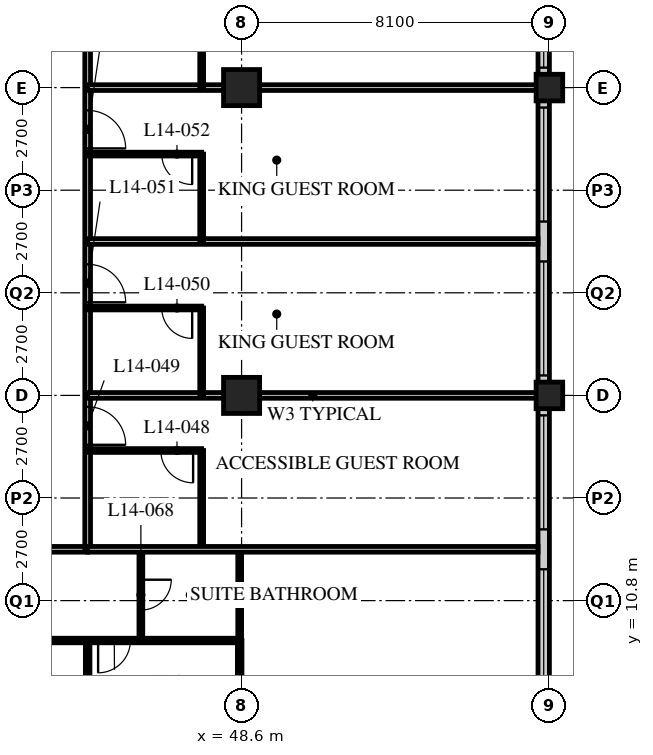
"""IFC4 building model, lengths in metres.
Left out: names, types, materials, properties, quantities, classifications, styles, units other than length and angle.
Written with IfcOpenShell. Run it as: python <this file> out.ifc"""

import sys

from ifc_helpers import new_model, si_unit, direction, frame, frame_2d, origin, origin_2d, place, context, subcontext, project, spatial, rectangle, hollow_rectangle, extrude, element, fill, save


model = new_model("IFC4")
c1 = context("Model", 3, precision=1e-05, world=origin(), true_north=direction((0.0, 1.0)))
c2 = subcontext(c1, "Body", "Model", "MODEL_VIEW")
j1 = project(units=[si_unit("LENGTHUNIT", "METRE"), si_unit("PLANEANGLEUNIT", "RADIAN")], contexts=[c1])
p1 = place(None, origin())
s1 = spatial("IfcSite", under=j1, at=p1, CompositionType="ELEMENT")
p2 = place(p1, origin())
s2 = spatial("IfcBuilding", under=s1, at=p2, CompositionType="ELEMENT")
p3 = place(p2, frame((0.0, 0.0, 60.2)))
s3 = spatial("IfcBuildingStorey", under=s2, at=p3, CompositionType="ELEMENT", Elevation=60.2)
for number, where, z_axis, x_axis in (
    (1, (48.6, 16.2, 0.0), (0.0, 0.0, 1.0), (1.0, 0.0, 0.0)),
    (2, (48.6, 24.3, 0.0), (0.0, 0.0, 1.0), (1.0, 0.0, 0.0)),
):
    element("IfcColumn", number, at=place(p3, frame(where, z_axis=z_axis, x_axis=x_axis)), inside=s3, PredefinedType="COLUMN", context=c2, shape_type="SweptSolid", body=[
        extrude(hollow_rectangle(XDim=0.95, YDim=0.95, WallThickness=0.095, at=origin_2d()), origin(), (0.0, 0.0, 1.0), 3.4),
    ])
for number, where, z_axis, x_axis in (
    (3, (56.7, 16.2, 0.0), (0.0, 0.0, 1.0), (1.0, 0.0, 0.0)),
    (4, (56.7, 24.3, 0.0), (0.0, 0.0, 1.0), (1.0, 0.0, 0.0)),
):
    element("IfcColumn", number, at=place(p3, frame(where, z_axis=z_axis, x_axis=x_axis)), inside=s3, PredefinedType="COLUMN", context=c2, shape_type="SweptSolid", body=[
        extrude(hollow_rectangle(XDim=0.7, YDim=0.7, WallThickness=0.06, at=origin_2d()), origin(), (0.0, 0.0, 1.0), 3.4),
    ])
p4 = place(p3, frame((56.55, 8.4, 0.0), z_axis=(0.0, 0.0, 1.0), x_axis=(0.0, 1.0, 0.0)))
e5 = element("IfcWall", 5, at=p4, inside=s3, PredefinedType="SOLIDWALL", context=c2, shape_type="SweptSolid", body=[
    extrude(rectangle(XDim=32.1, YDim=0.3, at=frame_2d((16.05, 0.0))), origin(), (0.0, 0.0, 1.0), 3.19),
])
p5 = place(p4, frame((0.225, 0.0, 0.9)))
e6 = element("IfcOpeningElement", 6, at=p5, cuts=e5, PredefinedType="OPENING", context=c2, shape_type="SweptSolid", body=[
    extrude(rectangle(XDim=3.0, YDim=2.0, at=frame_2d((1.5, 1.0))), frame((0.0, 0.16, 0.0), z_axis=(0.0, -1.0, 0.0), x_axis=(1.0, 0.0, 0.0)), (0.0, 0.0, 1.0), 0.32),
])
p6 = place(p4, frame((4.275, 0.0, 0.9)))
e7 = element("IfcOpeningElement", 7, at=p6, cuts=e5, PredefinedType="OPENING", context=c2, shape_type="SweptSolid", body=[
    extrude(rectangle(XDim=3.0, YDim=2.0, at=frame_2d((1.5, 1.0))), frame((0.0, 0.16, 0.0), z_axis=(0.0, -1.0, 0.0), x_axis=(1.0, 0.0, 0.0)), (0.0, 0.0, 1.0), 0.32),
])
p7 = place(p4, frame((8.325, 0.0, 0.9)))
e8 = element("IfcOpeningElement", 8, at=p7, cuts=e5, PredefinedType="OPENING", context=c2, shape_type="SweptSolid", body=[
    extrude(rectangle(XDim=3.0, YDim=2.0, at=frame_2d((1.5, 1.0))), frame((0.0, 0.16, 0.0), z_axis=(0.0, -1.0, 0.0), x_axis=(1.0, 0.0, 0.0)), (0.0, 0.0, 1.0), 0.32),
])
p8 = place(p4, frame((12.375, 0.0, 0.9)))
e9 = element("IfcOpeningElement", 9, at=p8, cuts=e5, PredefinedType="OPENING", context=c2, shape_type="SweptSolid", body=[
    extrude(rectangle(XDim=3.0, YDim=2.0, at=frame_2d((1.5, 1.0))), frame((0.0, 0.16, 0.0), z_axis=(0.0, -1.0, 0.0), x_axis=(1.0, 0.0, 0.0)), (0.0, 0.0, 1.0), 0.32),
])
p9 = place(p4, frame((16.425, 0.0, 0.9)))
e10 = element("IfcOpeningElement", 10, at=p9, cuts=e5, PredefinedType="OPENING", context=c2, shape_type="SweptSolid", body=[
    extrude(rectangle(XDim=3.0, YDim=2.0, at=frame_2d((1.5, 1.0))), frame((0.0, 0.16, 0.0), z_axis=(0.0, -1.0, 0.0), x_axis=(1.0, 0.0, 0.0)), (0.0, 0.0, 1.0), 0.32),
])
p10 = place(p4, frame((20.475, 0.0, 0.9)))
e11 = element("IfcOpeningElement", 11, at=p10, cuts=e5, PredefinedType="OPENING", context=c2, shape_type="SweptSolid", body=[
    extrude(rectangle(XDim=3.0, YDim=2.0, at=frame_2d((1.5, 1.0))), frame((0.0, 0.16, 0.0), z_axis=(0.0, -1.0, 0.0), x_axis=(1.0, 0.0, 0.0)), (0.0, 0.0, 1.0), 0.32),
])
p11 = place(p4, frame((24.525, 0.0, 0.9)))
e12 = element("IfcOpeningElement", 12, at=p11, cuts=e5, PredefinedType="OPENING", context=c2, shape_type="SweptSolid", body=[
    extrude(rectangle(XDim=3.0, YDim=2.0, at=frame_2d((1.5, 1.0))), frame((0.0, 0.16, 0.0), z_axis=(0.0, -1.0, 0.0), x_axis=(1.0, 0.0, 0.0)), (0.0, 0.0, 1.0), 0.32),
])
p12 = place(p4, frame((28.575, 0.0, 0.9)))
e13 = element("IfcOpeningElement", 13, at=p12, cuts=e5, PredefinedType="OPENING", context=c2, shape_type="SweptSolid", body=[
    extrude(rectangle(XDim=3.0, YDim=2.0, at=frame_2d((1.5, 1.0))), frame((0.0, 0.16, 0.0), z_axis=(0.0, -1.0, 0.0), x_axis=(1.0, 0.0, 0.0)), (0.0, 0.0, 1.0), 0.32),
])
p13 = place(p3, frame((12.15, 12.15, 0.0), z_axis=(0.0, 0.0, 1.0), x_axis=(1.0, 0.0, 0.0)))
e14 = element("IfcWall", 14, at=p13, inside=s3, PredefinedType="PARTITIONING", context=c2, shape_type="SweptSolid", body=[
    extrude(rectangle(XDim=32.4, YDim=0.15, at=frame_2d((16.2, 0.0))), origin(), (0.0, 0.0, 1.0), 3.19),
])
p14 = place(p13, frame((6.5, 0.0, 0.0)))
e15 = element("IfcOpeningElement", 15, at=p14, cuts=e14, PredefinedType="OPENING", context=c2, shape_type="SweptSolid", body=[
    extrude(rectangle(XDim=1.0, YDim=2.1, at=frame_2d((0.5, 1.05))), frame((0.0, 0.085, 0.0), z_axis=(0.0, -1.0, 0.0), x_axis=(1.0, 0.0, 0.0)), (0.0, 0.0, 1.0), 0.17),
])
p15 = place(p13, frame((8.4, 0.0, 0.0)))
e16 = element("IfcOpeningElement", 16, at=p15, cuts=e14, PredefinedType="OPENING", context=c2, shape_type="SweptSolid", body=[
    extrude(rectangle(XDim=1.0, YDim=2.1, at=frame_2d((0.5, 1.05))), frame((0.0, 0.085, 0.0), z_axis=(0.0, -1.0, 0.0), x_axis=(1.0, 0.0, 0.0)), (0.0, 0.0, 1.0), 0.17),
])
p16 = place(p13, frame((14.6, 0.0, 0.0)))
e17 = element("IfcOpeningElement", 17, at=p16, cuts=e14, PredefinedType="OPENING", context=c2, shape_type="SweptSolid", body=[
    extrude(rectangle(XDim=1.0, YDim=2.1, at=frame_2d((0.5, 1.05))), frame((0.0, 0.085, 0.0), z_axis=(0.0, -1.0, 0.0), x_axis=(1.0, 0.0, 0.0)), (0.0, 0.0, 1.0), 0.17),
])
p17 = place(p13, frame((18.65, 0.0, 0.0)))
e18 = element("IfcOpeningElement", 18, at=p17, cuts=e14, PredefinedType="OPENING", context=c2, shape_type="SweptSolid", body=[
    extrude(rectangle(XDim=1.0, YDim=2.1, at=frame_2d((0.5, 1.05))), frame((0.0, 0.085, 0.0), z_axis=(0.0, -1.0, 0.0), x_axis=(1.0, 0.0, 0.0)), (0.0, 0.0, 1.0), 0.17),
])
p18 = place(p13, frame((20.55, 0.0, 0.0)))
e19 = element("IfcOpeningElement", 19, at=p18, cuts=e14, PredefinedType="OPENING", context=c2, shape_type="SweptSolid", body=[
    extrude(rectangle(XDim=1.0, YDim=2.1, at=frame_2d((0.5, 1.05))), frame((0.0, 0.085, 0.0), z_axis=(0.0, -1.0, 0.0), x_axis=(1.0, 0.0, 0.0)), (0.0, 0.0, 1.0), 0.17),
])
p19 = place(p13, frame((26.75, 0.0, 0.0)))
e20 = element("IfcOpeningElement", 20, at=p19, cuts=e14, PredefinedType="OPENING", context=c2, shape_type="SweptSolid", body=[
    extrude(rectangle(XDim=1.0, YDim=2.1, at=frame_2d((0.5, 1.05))), frame((0.0, 0.085, 0.0), z_axis=(0.0, -1.0, 0.0), x_axis=(1.0, 0.0, 0.0)), (0.0, 0.0, 1.0), 0.17),
])
p20 = place(p13, frame((1.525, 0.0, 0.0)))
e21 = element("IfcOpeningElement", 21, at=p20, cuts=e14, PredefinedType="OPENING", context=c2, shape_type="SweptSolid", body=[
    extrude(rectangle(XDim=1.0, YDim=2.1, at=frame_2d((0.5, 1.05))), frame((0.0, 0.085, 0.0), z_axis=(0.0, -1.0, 0.0), x_axis=(1.0, 0.0, 0.0)), (0.0, 0.0, 1.0), 0.17),
])
p21 = place(p13, frame((29.875, 0.0, 0.0)))
e22 = element("IfcOpeningElement", 22, at=p21, cuts=e14, PredefinedType="OPENING", context=c2, shape_type="SweptSolid", body=[
    extrude(rectangle(XDim=1.0, YDim=2.1, at=frame_2d((0.5, 1.05))), frame((0.0, 0.085, 0.0), z_axis=(0.0, -1.0, 0.0), x_axis=(1.0, 0.0, 0.0)), (0.0, 0.0, 1.0), 0.17),
])
p22 = place(p3, frame((44.55, 12.15, 0.0), z_axis=(0.0, 0.0, 1.0), x_axis=(0.0, 1.0, 0.0)))
e23 = element("IfcWall", 23, at=p22, inside=s3, PredefinedType="PARTITIONING", context=c2, shape_type="SweptSolid", body=[
    extrude(rectangle(XDim=30.15, YDim=0.15, at=frame_2d((15.075, 0.0))), origin(), (0.0, 0.0, 1.0), 3.19),
])
p23 = place(p22, frame((2.75, 0.0, 0.0)))
e24 = element("IfcOpeningElement", 24, at=p23, cuts=e23, PredefinedType="OPENING", context=c2, shape_type="SweptSolid", body=[
    extrude(rectangle(XDim=1.0, YDim=2.1, at=frame_2d((0.5, 1.05))), frame((0.0, 0.085, 0.0), z_axis=(0.0, -1.0, 0.0), x_axis=(1.0, 0.0, 0.0)), (0.0, 0.0, 1.0), 0.17),
])
p24 = place(p22, frame((6.5, 0.0, 0.0)))
e25 = element("IfcOpeningElement", 25, at=p24, cuts=e23, PredefinedType="OPENING", context=c2, shape_type="SweptSolid", body=[
    extrude(rectangle(XDim=1.0, YDim=2.1, at=frame_2d((0.5, 1.05))), frame((0.0, 0.085, 0.0), z_axis=(0.0, -1.0, 0.0), x_axis=(1.0, 0.0, 0.0)), (0.0, 0.0, 1.0), 0.17),
])
p25 = place(p22, frame((10.55, 0.0, 0.0)))
e26 = element("IfcOpeningElement", 26, at=p25, cuts=e23, PredefinedType="OPENING", context=c2, shape_type="SweptSolid", body=[
    extrude(rectangle(XDim=1.0, YDim=2.1, at=frame_2d((0.5, 1.05))), frame((0.0, 0.085, 0.0), z_axis=(0.0, -1.0, 0.0), x_axis=(1.0, 0.0, 0.0)), (0.0, 0.0, 1.0), 0.17),
])
p26 = place(p22, frame((14.6, 0.0, 0.0)))
e27 = element("IfcOpeningElement", 27, at=p26, cuts=e23, PredefinedType="OPENING", context=c2, shape_type="SweptSolid", body=[
    extrude(rectangle(XDim=1.0, YDim=2.1, at=frame_2d((0.5, 1.05))), frame((0.0, 0.085, 0.0), z_axis=(0.0, -1.0, 0.0), x_axis=(1.0, 0.0, 0.0)), (0.0, 0.0, 1.0), 0.17),
])
p27 = place(p22, frame((18.65, 0.0, 0.0)))
e28 = element("IfcOpeningElement", 28, at=p27, cuts=e23, PredefinedType="OPENING", context=c2, shape_type="SweptSolid", body=[
    extrude(rectangle(XDim=1.0, YDim=2.1, at=frame_2d((0.5, 1.05))), frame((0.0, 0.085, 0.0), z_axis=(0.0, -1.0, 0.0), x_axis=(1.0, 0.0, 0.0)), (0.0, 0.0, 1.0), 0.17),
])
p28 = place(p22, frame((22.7, 0.0, 0.0)))
e29 = element("IfcOpeningElement", 29, at=p28, cuts=e23, PredefinedType="OPENING", context=c2, shape_type="SweptSolid", body=[
    extrude(rectangle(XDim=1.0, YDim=2.1, at=frame_2d((0.5, 1.05))), frame((0.0, 0.085, 0.0), z_axis=(0.0, -1.0, 0.0), x_axis=(1.0, 0.0, 0.0)), (0.0, 0.0, 1.0), 0.17),
])
p29 = place(p22, frame((26.7, 0.0, 0.0)))
e30 = element("IfcOpeningElement", 30, at=p29, cuts=e23, PredefinedType="OPENING", context=c2, shape_type="SweptSolid", body=[
    extrude(rectangle(XDim=1.0, YDim=2.1, at=frame_2d((0.5, 1.05))), frame((0.0, 0.085, 0.0), z_axis=(0.0, -1.0, 0.0), x_axis=(1.0, 0.0, 0.0)), (0.0, 0.0, 1.0), 0.17),
])
p30 = place(p3, frame((47.55, 12.15, 0.0), z_axis=(0.0, 0.0, 1.0), x_axis=(0.0, 1.0, 0.0)))
e31 = element("IfcWall", 31, at=p30, inside=s3, PredefinedType="PARTITIONING", context=c2, shape_type="SweptSolid", body=[
    extrude(rectangle(XDim=2.6, YDim=0.1, at=frame_2d((1.3, 0.0))), origin(), (0.0, 0.0, 1.0), 3.19),
])
p31 = place(p3, frame((44.55, 14.75, 0.0), z_axis=(0.0, 0.0, 1.0), x_axis=(1.0, 0.0, 0.0)))
e32 = element("IfcWall", 32, at=p31, inside=s3, PredefinedType="PARTITIONING", context=c2, shape_type="SweptSolid", body=[
    extrude(rectangle(XDim=3.0, YDim=0.1, at=frame_2d((1.5, 0.0))), origin(), (0.0, 0.0, 1.0), 3.19),
])
p32 = place(p31, frame((1.925, 0.0, 0.0)))
e33 = element("IfcOpeningElement", 33, at=p32, cuts=e32, PredefinedType="OPENING", context=c2, shape_type="SweptSolid", body=[
    extrude(rectangle(XDim=0.85, YDim=2.1, at=frame_2d((0.425, 1.05))), frame((0.0, 0.06, 0.0), z_axis=(0.0, -1.0, 0.0), x_axis=(1.0, 0.0, 0.0)), (0.0, 0.0, 1.0), 0.12),
])
p33 = place(p3, frame((44.55, 16.2, 0.0), z_axis=(0.0, 0.0, 1.0), x_axis=(1.0, 0.0, 0.0)))
e34 = element("IfcWall", 34, at=p33, inside=s3, PredefinedType="PARTITIONING", context=c2, shape_type="SweptSolid", body=[
    extrude(rectangle(XDim=11.85, YDim=0.15, at=frame_2d((5.925, 0.0))), origin(), (0.0, 0.0, 1.0), 2.578),
])
p34 = place(p3, frame((47.55, 16.2, 0.0), z_axis=(0.0, 0.0, 1.0), x_axis=(0.0, 1.0, 0.0)))
e35 = element("IfcWall", 35, at=p34, inside=s3, PredefinedType="PARTITIONING", context=c2, shape_type="SweptSolid", body=[
    extrude(rectangle(XDim=2.3, YDim=0.1, at=frame_2d((1.15, 0.0))), origin(), (0.0, 0.0, 1.0), 3.19),
])
p35 = place(p3, frame((44.55, 18.5, 0.0), z_axis=(0.0, 0.0, 1.0), x_axis=(1.0, 0.0, 0.0)))
e36 = element("IfcWall", 36, at=p35, inside=s3, PredefinedType="PARTITIONING", context=c2, shape_type="SweptSolid", body=[
    extrude(rectangle(XDim=3.0, YDim=0.1, at=frame_2d((1.5, 0.0))), origin(), (0.0, 0.0, 1.0), 3.19),
])
p36 = place(p35, frame((1.95, 0.0, 0.0)))
e37 = element("IfcOpeningElement", 37, at=p36, cuts=e36, PredefinedType="OPENING", context=c2, shape_type="SweptSolid", body=[
    extrude(rectangle(XDim=0.8, YDim=2.1, at=frame_2d((0.4, 1.05))), frame((0.0, 0.06, 0.0), z_axis=(0.0, -1.0, 0.0), x_axis=(1.0, 0.0, 0.0)), (0.0, 0.0, 1.0), 0.12),
])
p37 = place(p3, frame((44.55, 20.25, 0.0), z_axis=(0.0, 0.0, 1.0), x_axis=(1.0, 0.0, 0.0)))
e38 = element("IfcWall", 38, at=p37, inside=s3, PredefinedType="PARTITIONING", context=c2, shape_type="SweptSolid", body=[
    extrude(rectangle(XDim=11.85, YDim=0.15, at=frame_2d((5.925, 0.0))), origin(), (0.0, 0.0, 1.0), 3.19),
])
p38 = place(p3, frame((47.55, 20.25, 0.0), z_axis=(0.0, 0.0, 1.0), x_axis=(0.0, 1.0, 0.0)))
e39 = element("IfcWall", 39, at=p38, inside=s3, PredefinedType="PARTITIONING", context=c2, shape_type="SweptSolid", body=[
    extrude(rectangle(XDim=2.3, YDim=0.1, at=frame_2d((1.15, 0.0))), origin(), (0.0, 0.0, 1.0), 3.19),
])
p39 = place(p3, frame((44.55, 22.55, 0.0), z_axis=(0.0, 0.0, 1.0), x_axis=(1.0, 0.0, 0.0)))
e40 = element("IfcWall", 40, at=p39, inside=s3, PredefinedType="PARTITIONING", context=c2, shape_type="SweptSolid", body=[
    extrude(rectangle(XDim=3.0, YDim=0.1, at=frame_2d((1.5, 0.0))), origin(), (0.0, 0.0, 1.0), 3.19),
])
p40 = place(p39, frame((1.95, 0.0, 0.0)))
e41 = element("IfcOpeningElement", 41, at=p40, cuts=e40, PredefinedType="OPENING", context=c2, shape_type="SweptSolid", body=[
    extrude(rectangle(XDim=0.8, YDim=2.1, at=frame_2d((0.4, 1.05))), frame((0.0, 0.06, 0.0), z_axis=(0.0, -1.0, 0.0), x_axis=(1.0, 0.0, 0.0)), (0.0, 0.0, 1.0), 0.12),
])
p41 = place(p3, frame((44.55, 24.3, 0.0), z_axis=(0.0, 0.0, 1.0), x_axis=(1.0, 0.0, 0.0)))
e42 = element("IfcWall", 42, at=p41, inside=s3, PredefinedType="PARTITIONING", context=c2, shape_type="SweptSolid", body=[
    extrude(rectangle(XDim=11.85, YDim=0.15, at=frame_2d((5.925, 0.0))), origin(), (0.0, 0.0, 1.0), 2.578),
])
p42 = place(p3, frame((47.55, 24.3, 0.0), z_axis=(0.0, 0.0, 1.0), x_axis=(0.0, 1.0, 0.0)))
e43 = element("IfcWall", 43, at=p42, inside=s3, PredefinedType="PARTITIONING", context=c2, shape_type="SweptSolid", body=[
    extrude(rectangle(XDim=2.3, YDim=0.1, at=frame_2d((1.15, 0.0))), origin(), (0.0, 0.0, 1.0), 3.19),
])
p43 = place(p3, frame((40.5, 9.75, 0.0), z_axis=(0.0, 0.0, 1.0), x_axis=(1.0, 0.0, 0.0)))
e44 = element("IfcWall", 44, at=p43, inside=s3, PredefinedType="PARTITIONING", context=c2, shape_type="SweptSolid", body=[
    extrude(rectangle(XDim=8.05, YDim=0.12, at=frame_2d((4.025, 0.0))), origin(), (0.0, 0.0, 1.0), 3.19),
])
p44 = place(p43, frame((0.475, 0.0, 0.0)))
e45 = element("IfcOpeningElement", 45, at=p44, cuts=e44, PredefinedType="OPENING", context=c2, shape_type="SweptSolid", body=[
    extrude(rectangle(XDim=0.85, YDim=2.1, at=frame_2d((0.425, 1.05))), frame((0.0, 0.07, 0.0), z_axis=(0.0, -1.0, 0.0), x_axis=(1.0, 0.0, 0.0)), (0.0, 0.0, 1.0), 0.14),
])
p45 = place(p43, frame((4.325, 0.0, 0.0)))
e46 = element("IfcOpeningElement", 46, at=p45, cuts=e44, PredefinedType="OPENING", context=c2, shape_type="SweptSolid", body=[
    extrude(rectangle(XDim=0.85, YDim=2.1, at=frame_2d((0.425, 1.05))), frame((0.0, 0.07, 0.0), z_axis=(0.0, -1.0, 0.0), x_axis=(1.0, 0.0, 0.0)), (0.0, 0.0, 1.0), 0.14),
])
p46 = place(p3, frame((45.95, 12.15, 0.0), z_axis=(0.0, 0.0, 1.0), x_axis=(0.0, -1.0, 0.0)))
e47 = element("IfcWall", 47, at=p46, inside=s3, PredefinedType="PARTITIONING", context=c2, shape_type="SweptSolid", body=[
    extrude(rectangle(XDim=2.4, YDim=0.1, at=frame_2d((1.2, 0.0))), origin(), (0.0, 0.0, 1.0), 3.19),
])
p47 = place(p46, frame((0.8, 0.0, 0.0)))
e48 = element("IfcOpeningElement", 48, at=p47, cuts=e47, PredefinedType="OPENING", context=c2, shape_type="SweptSolid", body=[
    extrude(rectangle(XDim=0.8, YDim=2.1, at=frame_2d((0.4, 1.05))), frame((0.0, 0.06, 0.0), z_axis=(0.0, -1.0, 0.0), x_axis=(1.0, 0.0, 0.0)), (0.0, 0.0, 1.0), 0.12),
])
p48 = place(p3, frame((48.55, 12.15, 0.0), z_axis=(0.0, 0.0, 1.0), x_axis=(0.0, -1.0, 0.0)))
e49 = element("IfcWall", 49, at=p48, inside=s3, PredefinedType="PARTITIONING", context=c2, shape_type="SweptSolid", body=[
    extrude(rectangle(XDim=2.4, YDim=0.1, at=frame_2d((1.2, 0.0))), origin(), (0.0, 0.0, 1.0), 2.578),
])
p49 = place(p3, frame((44.55, 9.75, 0.0), z_axis=(0.0, 0.0, 1.0), x_axis=(0.0, -1.0, 0.0)))
e50 = element("IfcWall", 50, at=p49, inside=s3, PredefinedType="PARTITIONING", context=c2, shape_type="SweptSolid", body=[
    extrude(rectangle(XDim=9.45, YDim=0.12, at=frame_2d((4.725, 0.0))), origin(), (0.0, 0.0, 1.0), 3.19),
])
p50 = place(p3, frame((44.55, 12.15, 0.0), z_axis=(0.0, 0.0, 1.0), x_axis=(1.0, 0.0, 0.0)))
e51 = element("IfcWall", 51, at=p50, inside=s3, PredefinedType="PARTITIONING", context=c2, shape_type="SweptSolid", body=[
    extrude(rectangle(XDim=11.85, YDim=0.15, at=frame_2d((5.925, 0.0))), origin(), (0.0, 0.0, 1.0), 3.19),
])
p51 = place(p3, frame((48.55, 9.75, 0.0), z_axis=(0.0, 0.0, 1.0), x_axis=(0.0, -1.0, 0.0)))
e52 = element("IfcWall", 52, at=p51, inside=s3, PredefinedType="PARTITIONING", context=c2, shape_type="SweptSolid", body=[
    extrude(rectangle(XDim=1.175, YDim=0.12, at=frame_2d((0.587, 0.0))), origin(), (0.0, 0.0, 1.0), 2.578),
])
p52 = place(p5, origin())
e53 = element("IfcWindow", 53, at=p52, inside=s3, PartitioningType="SINGLE_PANEL", PredefinedType="WINDOW", context=c2, shape_type="SweptSolid", body=[
    extrude(rectangle(XDim=3.0, YDim=2.0, at=frame_2d((1.5, 1.0))), frame((0.0, 0.03, 0.0), z_axis=(0.0, -1.0, 0.0), x_axis=(1.0, 0.0, 0.0)), (0.0, 0.0, 1.0), 0.06),
])
fill(e6, e53)
p53 = place(p6, origin())
e54 = element("IfcWindow", 54, at=p53, inside=s3, PartitioningType="SINGLE_PANEL", PredefinedType="WINDOW", context=c2, shape_type="SweptSolid", body=[
    extrude(rectangle(XDim=3.0, YDim=2.0, at=frame_2d((1.5, 1.0))), frame((0.0, 0.03, 0.0), z_axis=(0.0, -1.0, 0.0), x_axis=(1.0, 0.0, 0.0)), (0.0, 0.0, 1.0), 0.06),
])
fill(e7, e54)
p54 = place(p7, origin())
e55 = element("IfcWindow", 55, at=p54, inside=s3, PartitioningType="SINGLE_PANEL", PredefinedType="WINDOW", context=c2, shape_type="SweptSolid", body=[
    extrude(rectangle(XDim=3.0, YDim=2.0, at=frame_2d((1.5, 1.0))), frame((0.0, 0.03, 0.0), z_axis=(0.0, -1.0, 0.0), x_axis=(1.0, 0.0, 0.0)), (0.0, 0.0, 1.0), 0.06),
])
fill(e8, e55)
p55 = place(p8, origin())
e56 = element("IfcWindow", 56, at=p55, inside=s3, PartitioningType="SINGLE_PANEL", PredefinedType="WINDOW", context=c2, shape_type="SweptSolid", body=[
    extrude(rectangle(XDim=3.0, YDim=2.0, at=frame_2d((1.5, 1.0))), frame((0.0, 0.03, 0.0), z_axis=(0.0, -1.0, 0.0), x_axis=(1.0, 0.0, 0.0)), (0.0, 0.0, 1.0), 0.06),
])
fill(e9, e56)
p56 = place(p9, origin())
e57 = element("IfcWindow", 57, at=p56, inside=s3, PartitioningType="SINGLE_PANEL", PredefinedType="WINDOW", context=c2, shape_type="SweptSolid", body=[
    extrude(rectangle(XDim=3.0, YDim=2.0, at=frame_2d((1.5, 1.0))), frame((0.0, 0.03, 0.0), z_axis=(0.0, -1.0, 0.0), x_axis=(1.0, 0.0, 0.0)), (0.0, 0.0, 1.0), 0.06),
])
fill(e10, e57)
p57 = place(p32, origin())
e58 = element("IfcDoor", 58, at=p57, inside=s3, OperationType="SINGLE_SWING_LEFT", PredefinedType="DOOR", context=c2, shape_type="SweptSolid", body=[
    extrude(rectangle(XDim=0.85, YDim=2.1, at=frame_2d((0.425, 1.05))), frame((0.0, 0.025, 0.0), z_axis=(0.0, -1.0, 0.0), x_axis=(1.0, 0.0, 0.0)), (0.0, 0.0, 1.0), 0.05),
])
fill(e33, e58)
p58 = place(p23, origin())
e59 = element("IfcDoor", 59, at=p58, inside=s3, OperationType="SINGLE_SWING_RIGHT", PredefinedType="DOOR", context=c2, shape_type="SweptSolid", body=[
    extrude(rectangle(XDim=1.0, YDim=2.1, at=frame_2d((0.5, 1.05))), frame((0.0, 0.025, 0.0), z_axis=(0.0, -1.0, 0.0), x_axis=(1.0, 0.0, 0.0)), (0.0, 0.0, 1.0), 0.05),
])
fill(e24, e59)
p59 = place(p36, origin())
e60 = element("IfcDoor", 60, at=p59, inside=s3, OperationType="SINGLE_SWING_LEFT", PredefinedType="DOOR", context=c2, shape_type="SweptSolid", body=[
    extrude(rectangle(XDim=0.8, YDim=2.1, at=frame_2d((0.4, 1.05))), frame((0.0, 0.025, 0.0), z_axis=(0.0, -1.0, 0.0), x_axis=(1.0, 0.0, 0.0)), (0.0, 0.0, 1.0), 0.05),
])
fill(e37, e60)
p60 = place(p24, origin())
e61 = element("IfcDoor", 61, at=p60, inside=s3, OperationType="SINGLE_SWING_RIGHT", PredefinedType="DOOR", context=c2, shape_type="SweptSolid", body=[
    extrude(rectangle(XDim=1.0, YDim=2.1, at=frame_2d((0.5, 1.05))), frame((0.0, 0.025, 0.0), z_axis=(0.0, -1.0, 0.0), x_axis=(1.0, 0.0, 0.0)), (0.0, 0.0, 1.0), 0.05),
])
fill(e25, e61)
p61 = place(p40, origin())
e62 = element("IfcDoor", 62, at=p61, inside=s3, OperationType="SINGLE_SWING_LEFT", PredefinedType="DOOR", context=c2, shape_type="SweptSolid", body=[
    extrude(rectangle(XDim=0.8, YDim=2.1, at=frame_2d((0.4, 1.05))), frame((0.0, 0.025, 0.0), z_axis=(0.0, -1.0, 0.0), x_axis=(1.0, 0.0, 0.0)), (0.0, 0.0, 1.0), 0.05),
])
fill(e41, e62)
p62 = place(p25, origin())
e63 = element("IfcDoor", 63, at=p62, inside=s3, OperationType="SINGLE_SWING_RIGHT", PredefinedType="DOOR", context=c2, shape_type="SweptSolid", body=[
    extrude(rectangle(XDim=1.0, YDim=2.1, at=frame_2d((0.5, 1.05))), frame((0.0, 0.025, 0.0), z_axis=(0.0, -1.0, 0.0), x_axis=(1.0, 0.0, 0.0)), (0.0, 0.0, 1.0), 0.05),
])
fill(e26, e63)
p63 = place(p47, origin())
e64 = element("IfcDoor", 64, at=p63, inside=s3, OperationType="SINGLE_SWING_LEFT", PredefinedType="DOOR", context=c2, shape_type="SweptSolid", body=[
    extrude(rectangle(XDim=0.8, YDim=2.1, at=frame_2d((0.4, 1.05))), frame((0.0, 0.025, 0.0), z_axis=(0.0, -1.0, 0.0), x_axis=(1.0, 0.0, 0.0)), (0.0, 0.0, 1.0), 0.05),
])
fill(e48, e64)
p64 = place(p45, origin())
e65 = element("IfcDoor", 65, at=p64, inside=s3, OperationType="SINGLE_SWING_RIGHT", PredefinedType="DOOR", context=c2, shape_type="SweptSolid", body=[
    extrude(rectangle(XDim=0.85, YDim=2.1, at=frame_2d((0.425, 1.05))), frame((0.0, 0.025, 0.0), z_axis=(0.0, -1.0, 0.0), x_axis=(1.0, 0.0, 0.0)), (0.0, 0.0, 1.0), 0.05),
])
fill(e46, e65)
save(model, sys.argv[1])
